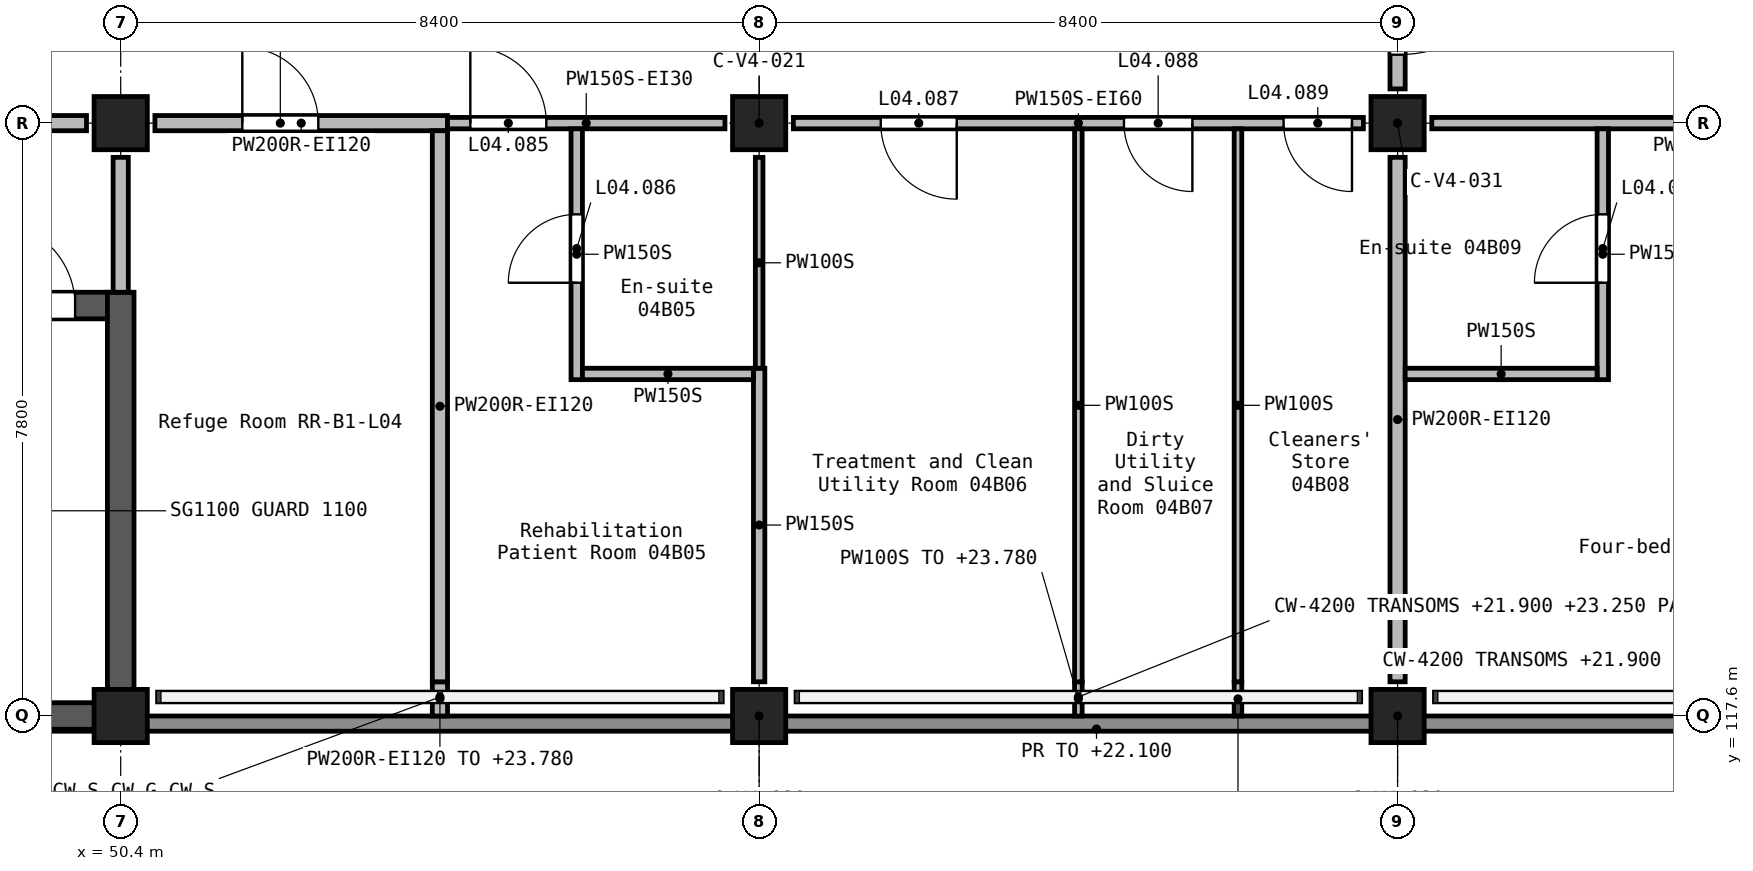
"""IFC4 building model, lengths in metres.
Left out: names, types, materials, properties, quantities, classifications, styles, units other than length and angle.
Written with IfcOpenShell. Run it as: python <this file> out.ifc"""

import sys

from ifc_helpers import new_model, si_unit, direction, frame, frame_2d, origin, origin_2d, place, context, subcontext, project, spatial, polyline, rectangle, outline, extrude, element, fill, save


model = new_model("IFC4")
c1 = context("Model", 3, precision=1e-05, world=origin(), true_north=direction((0.0, 1.0)))
c2 = subcontext(c1, "Body", "Model", "MODEL_VIEW")
j1 = project(units=[si_unit("LENGTHUNIT", "METRE"), si_unit("PLANEANGLEUNIT", "RADIAN")], contexts=[c1])
p1 = place(None, origin())
s1 = spatial("IfcSite", under=j1, at=p1, CompositionType="ELEMENT")
p2 = place(p1, origin())
s2 = spatial("IfcBuilding", under=s1, at=p2, CompositionType="ELEMENT")
p3 = place(p2, frame((0.0, 0.0, 21.0)))
s3 = spatial("IfcBuildingStorey", under=s2, at=p3, CompositionType="ELEMENT", Elevation=21.0)
for number, where, z_axis, x_axis in (
    (1, (50.4, 117.6, 0.0), (0.0, 0.0, 1.0), (1.0, 0.0, 0.0)),
    (2, (50.4, 125.4, 0.0), (0.0, 0.0, 1.0), (1.0, 0.0, 0.0)),
    (3, (58.8, 117.6, 0.0), (0.0, 0.0, 1.0), (1.0, 0.0, 0.0)),
    (4, (58.8, 125.4, 0.0), (0.0, 0.0, 1.0), (1.0, 0.0, 0.0)),
    (5, (67.2, 117.6, 0.0), (0.0, 0.0, 1.0), (1.0, 0.0, 0.0)),
    (6, (67.2, 125.4, 0.0), (0.0, 0.0, 1.0), (1.0, 0.0, 0.0)),
):
    element("IfcColumn", number, at=place(p3, frame(where, z_axis=z_axis, x_axis=x_axis)), inside=s3, PredefinedType="COLUMN", context=c2, shape_type="SweptSolid", body=[
        extrude(rectangle(XDim=0.7, YDim=0.7, at=origin_2d()), origin(), (0.0, 0.0, 1.0), 3.9),
    ])
p4 = place(p3, frame((41.825, 123.0, 0.0), z_axis=(0.0, 0.0, 1.0), x_axis=(1.0, 0.0, 0.0)))
e7 = element("IfcWall", 7, at=p4, inside=s3, PredefinedType="SHEAR", context=c2, shape_type="SweptSolid", body=[
    extrude(rectangle(XDim=8.4, YDim=0.35, at=frame_2d((4.2, 0.0))), origin(), (0.0, 0.0, 1.0), 3.9),
])
p5 = place(p4, frame((6.875, 0.0, 0.0)))
e8 = element("IfcOpeningElement", 8, at=p5, cuts=e7, PredefinedType="OPENING", context=c2, shape_type="SweptSolid", body=[
    extrude(rectangle(XDim=1.1, YDim=2.1, at=frame_2d((0.55, 1.05))), frame((0.0, 0.185, 0.0), z_axis=(0.0, -1.0, 0.0), x_axis=(1.0, 0.0, 0.0)), (0.0, 0.0, 1.0), 0.37),
])
p6 = place(p3, frame((42.175, 117.6, 0.0), z_axis=(0.0, 0.0, 1.0), x_axis=(1.0, 0.0, 0.0)))
e9 = element("IfcWall", 9, at=p6, inside=s3, PredefinedType="SHEAR", context=c2, shape_type="SweptSolid", body=[
    extrude(rectangle(XDim=8.05, YDim=0.35, at=frame_2d((4.025, 0.0))), origin(), (0.0, 0.0, 1.0), 3.9),
])
p7 = place(p3, frame((50.4, 117.425, 0.0), z_axis=(0.0, 0.0, 1.0), x_axis=(0.0, 1.0, 0.0)))
e10 = element("IfcWall", 10, at=p7, inside=s3, PredefinedType="SHEAR", context=c2, shape_type="SweptSolid", body=[
    extrude(rectangle(XDim=5.75, YDim=0.35, at=frame_2d((2.875, 0.0))), origin(), (0.0, 0.0, 1.0), 3.9),
])
p8 = place(p3, origin())
e11 = element("IfcWall", 11, at=p8, inside=s3, PredefinedType="PARAPET", context=c2, shape_type="SweptSolid", body=[
    extrude(outline(polyline([(42.2, 117.4), (42.18, 117.42), (50.575, 117.42), (50.575, 117.42), (50.576, 117.42), (50.576, 117.42), (50.577, 117.42), (50.577, 117.421), (50.578, 117.421), (50.578, 117.421), (50.579, 117.421), (50.579, 117.422), (50.579, 117.422), (50.579, 117.423), (50.58, 117.423), (50.58, 117.424), (50.58, 117.424), (50.58, 117.425), (50.58, 117.425), (50.58, 117.6), (75.42, 117.6), (75.42, 117.425), (75.42, 117.425), (75.42, 117.424), (75.42, 117.424), (75.42, 117.423), (75.421, 117.423), (75.421, 117.422), (75.421, 117.422), (75.421, 117.421), (75.422, 117.421), (75.422, 117.421), (75.423, 117.421), (75.423, 117.42), (75.424, 117.42), (75.424, 117.42), (75.425, 117.42), (75.425, 117.42), (75.775, 117.42), (75.775, 117.42), (76.049, 117.42), (76.035, 117.4), (42.2, 117.4)])), origin(), (0.0, 0.0, 1.0), 1.1),
])
p9 = place(p3, frame((67.2, 128.55, 0.0), z_axis=(0.0, 0.0, 1.0), x_axis=(0.0, -1.0, 0.0)))
e12 = element("IfcWall", 12, at=p9, inside=s3, PredefinedType="SOLIDWALL", context=c2, shape_type="SweptSolid", body=[
    extrude(rectangle(XDim=2.7, YDim=0.2, at=frame_2d((1.35, 0.0))), origin(), (0.0, 0.0, 1.0), 3.6),
])
p10 = place(p9, frame((0.45, 0.0, 0.0)))
e13 = element("IfcOpeningElement", 13, at=p10, cuts=e12, PredefinedType="OPENING", context=c2, shape_type="SweptSolid", body=[
    extrude(rectangle(XDim=1.8, YDim=2.1, at=frame_2d((0.9, 1.05))), frame((0.0, 0.11, 0.0), z_axis=(0.0, -1.0, 0.0), x_axis=(1.0, 0.0, 0.0)), (0.0, 0.0, 1.0), 0.22),
])
p11 = place(p3, frame((67.2, 124.95, 0.0), z_axis=(0.0, 0.0, 1.0), x_axis=(0.0, -1.0, 0.0)))
e14 = element("IfcWall", 14, at=p11, inside=s3, PredefinedType="SOLIDWALL", context=c2, shape_type="SweptSolid", body=[
    extrude(rectangle(XDim=6.9, YDim=0.2, at=frame_2d((3.45, 0.0))), origin(), (0.0, 0.0, 1.0), 3.6),
])
p12 = place(p3, frame((42.45, 125.4, 0.0), z_axis=(0.0, 0.0, 1.0), x_axis=(1.0, 0.0, 0.0)))
e15 = element("IfcWall", 15, at=p12, inside=s3, PredefinedType="SOLIDWALL", context=c2, shape_type="SweptSolid", body=[
    extrude(rectangle(XDim=7.5, YDim=0.2, at=frame_2d((3.75, 0.0))), origin(), (0.0, 0.0, 1.0), 3.6),
])
p13 = place(p12, frame((3.2, 0.0, 0.0)))
e16 = element("IfcOpeningElement", 16, at=p13, cuts=e15, PredefinedType="OPENING", context=c2, shape_type="SweptSolid", body=[
    extrude(rectangle(XDim=1.1, YDim=2.1, at=frame_2d((0.55, 1.05))), frame((0.0, 0.11, 0.0), z_axis=(0.0, -1.0, 0.0), x_axis=(1.0, 0.0, 0.0)), (0.0, 0.0, 1.0), 0.22),
])
p14 = place(p3, frame((50.85, 125.4, 0.0), z_axis=(0.0, 0.0, 1.0), x_axis=(1.0, 0.0, 0.0)))
e17 = element("IfcWall", 17, at=p14, inside=s3, PredefinedType="SOLIDWALL", context=c2, shape_type="SweptSolid", body=[
    extrude(rectangle(XDim=3.85, YDim=0.2, at=frame_2d((1.925, 0.0))), origin(), (0.0, 0.0, 1.0), 3.6),
])
p15 = place(p14, frame((1.15, 0.0, 0.0)))
e18 = element("IfcOpeningElement", 18, at=p15, cuts=e17, PredefinedType="OPENING", context=c2, shape_type="SweptSolid", body=[
    extrude(rectangle(XDim=1.0, YDim=2.1, at=frame_2d((0.5, 1.05))), frame((0.0, 0.11, 0.0), z_axis=(0.0, -1.0, 0.0), x_axis=(1.0, 0.0, 0.0)), (0.0, 0.0, 1.0), 0.22),
])
p16 = place(p3, frame((50.4, 123.175, 0.0), z_axis=(0.0, 0.0, 1.0), x_axis=(0.0, 1.0, 0.0)))
e19 = element("IfcWall", 19, at=p16, inside=s3, PredefinedType="SOLIDWALL", context=c2, shape_type="SweptSolid", body=[
    extrude(rectangle(XDim=1.775, YDim=0.2, at=frame_2d((0.887, 0.0))), origin(), (0.0, 0.0, 1.0), 3.6),
])
p17 = place(p3, frame((54.6, 117.6, 0.0), z_axis=(0.0, 0.0, 1.0), x_axis=(0.0, 1.0, 0.0)))
e20 = element("IfcWall", 20, at=p17, inside=s3, PredefinedType="SOLIDWALL", context=c2, shape_type="SweptSolid", body=[
    extrude(rectangle(XDim=0.45, YDim=0.2, at=frame_2d((0.225, 0.0))), origin(), (0.0, 0.0, 1.0), 2.78),
])
p18 = place(p3, frame((54.6, 118.05, 0.0), z_axis=(0.0, 0.0, 1.0), x_axis=(0.0, 1.0, 0.0)))
e21 = element("IfcWall", 21, at=p18, inside=s3, PredefinedType="SOLIDWALL", context=c2, shape_type="SweptSolid", body=[
    extrude(rectangle(XDim=7.25, YDim=0.2, at=frame_2d((3.625, 0.0))), origin(), (0.0, 0.0, 1.0), 3.6),
])
p19 = place(p3, frame((66.75, 125.4, 0.0), z_axis=(0.0, 0.0, 1.0), x_axis=(-1.0, 0.0, 0.0)))
e22 = element("IfcWall", 22, at=p19, inside=s3, PredefinedType="PARTITIONING", context=c2, shape_type="SweptSolid", body=[
    extrude(rectangle(XDim=7.5, YDim=0.15, at=frame_2d((3.75, 0.0))), origin(), (0.0, 0.0, 1.0), 3.6),
])
p20 = place(p19, frame((5.35, 0.0, 0.0)))
e23 = element("IfcOpeningElement", 23, at=p20, cuts=e22, PredefinedType="OPENING", context=c2, shape_type="SweptSolid", body=[
    extrude(rectangle(XDim=1.0, YDim=2.1, at=frame_2d((0.5, 1.05))), frame((0.0, 0.085, 0.0), z_axis=(0.0, -1.0, 0.0), x_axis=(1.0, 0.0, 0.0)), (0.0, 0.0, 1.0), 0.17),
])
p21 = place(p19, frame((2.25, 0.0, 0.0)))
e24 = element("IfcOpeningElement", 24, at=p21, cuts=e22, PredefinedType="OPENING", context=c2, shape_type="SweptSolid", body=[
    extrude(rectangle(XDim=0.9, YDim=2.1, at=frame_2d((0.45, 1.05))), frame((0.0, 0.085, 0.0), z_axis=(0.0, -1.0, 0.0), x_axis=(1.0, 0.0, 0.0)), (0.0, 0.0, 1.0), 0.17),
])
p22 = place(p19, frame((0.15, 0.0, 0.0)))
e25 = element("IfcOpeningElement", 25, at=p22, cuts=e22, PredefinedType="OPENING", context=c2, shape_type="SweptSolid", body=[
    extrude(rectangle(XDim=0.9, YDim=2.1, at=frame_2d((0.45, 1.05))), frame((0.0, 0.085, 0.0), z_axis=(0.0, -1.0, 0.0), x_axis=(1.0, 0.0, 0.0)), (0.0, 0.0, 1.0), 0.17),
])
p23 = place(p3, frame((67.65, 125.4, 0.0), z_axis=(0.0, 0.0, 1.0), x_axis=(1.0, 0.0, 0.0)))
e26 = element("IfcWall", 26, at=p23, inside=s3, PredefinedType="PARTITIONING", context=c2, shape_type="SweptSolid", body=[
    extrude(rectangle(XDim=7.5, YDim=0.15, at=frame_2d((3.75, 0.0))), origin(), (0.0, 0.0, 1.0), 3.6),
])
p24 = place(p23, frame((4.6, 0.0, 0.0)))
e27 = element("IfcOpeningElement", 27, at=p24, cuts=e26, PredefinedType="OPENING", context=c2, shape_type="SweptSolid", body=[
    extrude(rectangle(XDim=1.0, YDim=2.1, at=frame_2d((0.5, 1.05))), frame((0.0, 0.085, 0.0), z_axis=(0.0, -1.0, 0.0), x_axis=(1.0, 0.0, 0.0)), (0.0, 0.0, 1.0), 0.17),
])
p25 = place(p3, frame((54.7, 125.4, 0.0), z_axis=(0.0, 0.0, 1.0), x_axis=(1.0, 0.0, 0.0)))
e28 = element("IfcWall", 28, at=p25, inside=s3, PredefinedType="PARTITIONING", context=c2, shape_type="SweptSolid", body=[
    extrude(rectangle(XDim=3.65, YDim=0.15, at=frame_2d((1.825, 0.0))), origin(), (0.0, 0.0, 1.0), 3.6),
])
p26 = place(p25, frame((0.3, 0.0, 0.0)))
e29 = element("IfcOpeningElement", 29, at=p26, cuts=e28, PredefinedType="OPENING", context=c2, shape_type="SweptSolid", body=[
    extrude(rectangle(XDim=1.0, YDim=2.1, at=frame_2d((0.5, 1.05))), frame((0.0, 0.085, 0.0), z_axis=(0.0, -1.0, 0.0), x_axis=(1.0, 0.0, 0.0)), (0.0, 0.0, 1.0), 0.17),
])
p27 = place(p3, frame((58.8, 118.05, 0.0), z_axis=(0.0, 0.0, 1.0), x_axis=(0.0, 1.0, 0.0)))
e30 = element("IfcWall", 30, at=p27, inside=s3, PredefinedType="PARTITIONING", context=c2, shape_type="SweptSolid", body=[
    extrude(rectangle(XDim=4.125, YDim=0.15, at=frame_2d((2.062, 0.0))), origin(), (0.0, 0.0, 1.0), 3.6),
])
p28 = place(p3, frame((56.4, 122.025, 0.0), z_axis=(0.0, 0.0, 1.0), x_axis=(0.0, 1.0, 0.0)))
e31 = element("IfcWall", 31, at=p28, inside=s3, PredefinedType="PARTITIONING", context=c2, shape_type="SweptSolid", body=[
    extrude(rectangle(XDim=3.3, YDim=0.15, at=frame_2d((1.65, 0.0))), origin(), (0.0, 0.0, 1.0), 3.6),
])
p29 = place(p28, frame((1.275, 0.0, 0.0)))
e32 = element("IfcOpeningElement", 32, at=p29, cuts=e31, PredefinedType="OPENING", context=c2, shape_type="SweptSolid", body=[
    extrude(rectangle(XDim=0.9, YDim=2.1, at=frame_2d((0.45, 1.05))), frame((0.0, 0.085, 0.0), z_axis=(0.0, -1.0, 0.0), x_axis=(1.0, 0.0, 0.0)), (0.0, 0.0, 1.0), 0.17),
])
p30 = place(p3, frame((69.9, 122.025, 0.0), z_axis=(0.0, 0.0, 1.0), x_axis=(0.0, 1.0, 0.0)))
e33 = element("IfcWall", 33, at=p30, inside=s3, PredefinedType="PARTITIONING", context=c2, shape_type="SweptSolid", body=[
    extrude(rectangle(XDim=3.3, YDim=0.15, at=frame_2d((1.65, 0.0))), origin(), (0.0, 0.0, 1.0), 3.6),
])
p31 = place(p30, frame((1.275, 0.0, 0.0)))
e34 = element("IfcOpeningElement", 34, at=p31, cuts=e33, PredefinedType="OPENING", context=c2, shape_type="SweptSolid", body=[
    extrude(rectangle(XDim=0.9, YDim=2.1, at=frame_2d((0.45, 1.05))), frame((0.0, 0.085, 0.0), z_axis=(0.0, -1.0, 0.0), x_axis=(1.0, 0.0, 0.0)), (0.0, 0.0, 1.0), 0.17),
])
p32 = place(p3, frame((67.3, 122.1, 0.0), z_axis=(0.0, 0.0, 1.0), x_axis=(1.0, 0.0, 0.0)))
e35 = element("IfcWall", 35, at=p32, inside=s3, PredefinedType="PARTITIONING", context=c2, shape_type="SweptSolid", body=[
    extrude(rectangle(XDim=2.525, YDim=0.15, at=frame_2d((1.262, 0.0))), origin(), (0.0, 0.0, 1.0), 3.6),
])
p33 = place(p3, frame((56.475, 122.1, 0.0), z_axis=(0.0, 0.0, 1.0), x_axis=(1.0, 0.0, 0.0)))
e36 = element("IfcWall", 36, at=p33, inside=s3, PredefinedType="PARTITIONING", context=c2, shape_type="SweptSolid", body=[
    extrude(rectangle(XDim=2.25, YDim=0.15, at=frame_2d((1.125, 0.0))), origin(), (0.0, 0.0, 1.0), 3.6),
])
p34 = place(p3, frame((63.0, 117.6, 0.0), z_axis=(0.0, 0.0, 1.0), x_axis=(0.0, 1.0, 0.0)))
e37 = element("IfcWall", 37, at=p34, inside=s3, PredefinedType="PARTITIONING", context=c2, shape_type="SweptSolid", body=[
    extrude(rectangle(XDim=0.45, YDim=0.1, at=frame_2d((0.225, 0.0))), origin(), (0.0, 0.0, 1.0), 2.78),
])
p35 = place(p3, frame((63.0, 118.05, 0.0), z_axis=(0.0, 0.0, 1.0), x_axis=(0.0, 1.0, 0.0)))
e38 = element("IfcWall", 38, at=p35, inside=s3, PredefinedType="PARTITIONING", context=c2, shape_type="SweptSolid", body=[
    extrude(rectangle(XDim=7.275, YDim=0.1, at=frame_2d((3.637, 0.0))), origin(), (0.0, 0.0, 1.0), 3.6),
])
p36 = place(p3, frame((65.1, 117.6, 0.0), z_axis=(0.0, 0.0, 1.0), x_axis=(0.0, 1.0, 0.0)))
e39 = element("IfcWall", 39, at=p36, inside=s3, PredefinedType="PARTITIONING", context=c2, shape_type="SweptSolid", body=[
    extrude(rectangle(XDim=0.45, YDim=0.1, at=frame_2d((0.225, 0.0))), origin(), (0.0, 0.0, 1.0), 2.78),
])
p37 = place(p3, frame((65.1, 118.05, 0.0), z_axis=(0.0, 0.0, 1.0), x_axis=(0.0, 1.0, 0.0)))
e40 = element("IfcWall", 40, at=p37, inside=s3, PredefinedType="PARTITIONING", context=c2, shape_type="SweptSolid", body=[
    extrude(rectangle(XDim=7.275, YDim=0.1, at=frame_2d((3.637, 0.0))), origin(), (0.0, 0.0, 1.0), 3.6),
])
p38 = place(p3, frame((58.8, 122.175, 0.0), z_axis=(0.0, 0.0, 1.0), x_axis=(0.0, 1.0, 0.0)))
e41 = element("IfcWall", 41, at=p38, inside=s3, PredefinedType="PARTITIONING", context=c2, shape_type="SweptSolid", body=[
    extrude(rectangle(XDim=2.775, YDim=0.1, at=frame_2d((1.387, 0.0))), origin(), (0.0, 0.0, 1.0), 3.6),
])
p39 = place(p10, origin())
e42 = element("IfcDoor", 42, at=p39, inside=s3, OperationType="DOUBLE_DOOR_SINGLE_SWING", PredefinedType="DOOR", context=c2, shape_type="SweptSolid", body=[
    extrude(rectangle(XDim=1.8, YDim=2.1, at=frame_2d((0.9, 1.05))), frame((0.0, 0.025, 0.0), z_axis=(0.0, -1.0, 0.0), x_axis=(1.0, 0.0, 0.0)), (0.0, 0.0, 1.0), 0.05),
])
fill(e13, e42)
p40 = place(p26, frame((1.0, 0.0, 0.0), z_axis=(0.0, 0.0, 1.0), x_axis=(-1.0, 0.0, 0.0)))
e43 = element("IfcDoor", 43, at=p40, inside=s3, OperationType="SINGLE_SWING_RIGHT", PredefinedType="DOOR", context=c2, shape_type="SweptSolid", body=[
    extrude(rectangle(XDim=1.0, YDim=2.1, at=frame_2d((0.5, 1.05))), frame((0.0, 0.025, 0.0), z_axis=(0.0, -1.0, 0.0), x_axis=(1.0, 0.0, 0.0)), (0.0, 0.0, 1.0), 0.05),
])
fill(e29, e43)
p41 = place(p29, frame((0.9, 0.0, 0.0), z_axis=(0.0, 0.0, 1.0), x_axis=(-1.0, 0.0, 0.0)))
e44 = element("IfcDoor", 44, at=p41, inside=s3, OperationType="SINGLE_SWING_LEFT", PredefinedType="DOOR", context=c2, shape_type="SweptSolid", body=[
    extrude(rectangle(XDim=0.9, YDim=2.1, at=frame_2d((0.45, 1.05))), frame((0.0, 0.025, 0.0), z_axis=(0.0, -1.0, 0.0), x_axis=(1.0, 0.0, 0.0)), (0.0, 0.0, 1.0), 0.05),
])
fill(e32, e44)
p42 = place(p20, origin())
e45 = element("IfcDoor", 45, at=p42, inside=s3, OperationType="SINGLE_SWING_RIGHT", PredefinedType="DOOR", context=c2, shape_type="SweptSolid", body=[
    extrude(rectangle(XDim=1.0, YDim=2.1, at=frame_2d((0.5, 1.05))), frame((0.0, 0.025, 0.0), z_axis=(0.0, -1.0, 0.0), x_axis=(1.0, 0.0, 0.0)), (0.0, 0.0, 1.0), 0.05),
])
fill(e23, e45)
p43 = place(p21, origin())
e46 = element("IfcDoor", 46, at=p43, inside=s3, OperationType="SINGLE_SWING_LEFT", PredefinedType="DOOR", context=c2, shape_type="SweptSolid", body=[
    extrude(rectangle(XDim=0.9, YDim=2.1, at=frame_2d((0.45, 1.05))), frame((0.0, 0.025, 0.0), z_axis=(0.0, -1.0, 0.0), x_axis=(1.0, 0.0, 0.0)), (0.0, 0.0, 1.0), 0.05),
])
fill(e24, e46)
p44 = place(p22, origin())
e47 = element("IfcDoor", 47, at=p44, inside=s3, OperationType="SINGLE_SWING_LEFT", PredefinedType="DOOR", context=c2, shape_type="SweptSolid", body=[
    extrude(rectangle(XDim=0.9, YDim=2.1, at=frame_2d((0.45, 1.05))), frame((0.0, 0.025, 0.0), z_axis=(0.0, -1.0, 0.0), x_axis=(1.0, 0.0, 0.0)), (0.0, 0.0, 1.0), 0.05),
])
fill(e25, e47)
p45 = place(p31, origin())
e48 = element("IfcDoor", 48, at=p45, inside=s3, OperationType="SINGLE_SWING_RIGHT", PredefinedType="DOOR", context=c2, shape_type="SweptSolid", body=[
    extrude(rectangle(XDim=0.9, YDim=2.1, at=frame_2d((0.45, 1.05))), frame((0.0, 0.025, 0.0), z_axis=(0.0, -1.0, 0.0), x_axis=(1.0, 0.0, 0.0)), (0.0, 0.0, 1.0), 0.05),
])
fill(e34, e48)
p46 = place(p15, frame((1.0, 0.0, 0.0), z_axis=(0.0, 0.0, 1.0), x_axis=(-1.0, 0.0, 0.0)))
e49 = element("IfcDoor", 49, at=p46, inside=s3, OperationType="SINGLE_SWING_RIGHT", PredefinedType="DOOR", context=c2, shape_type="SweptSolid", body=[
    extrude(rectangle(XDim=1.0, YDim=2.1, at=frame_2d((0.5, 1.05))), frame((0.0, 0.025, 0.0), z_axis=(0.0, -1.0, 0.0), x_axis=(1.0, 0.0, 0.0)), (0.0, 0.0, 1.0), 0.05),
])
fill(e18, e49)
p47 = place(p5, frame((1.1, 0.0, 0.0), z_axis=(0.0, 0.0, 1.0), x_axis=(-1.0, 0.0, 0.0)))
e50 = element("IfcDoor", 50, at=p47, inside=s3, OperationType="SINGLE_SWING_LEFT", PredefinedType="DOOR", context=c2, shape_type="SweptSolid", body=[
    extrude(rectangle(XDim=1.1, YDim=2.1, at=frame_2d((0.55, 1.05))), frame((0.0, 0.025, 0.0), z_axis=(0.0, -1.0, 0.0), x_axis=(1.0, 0.0, 0.0)), (0.0, 0.0, 1.0), 0.05),
])
fill(e8, e50)
save(model, sys.argv[1])
